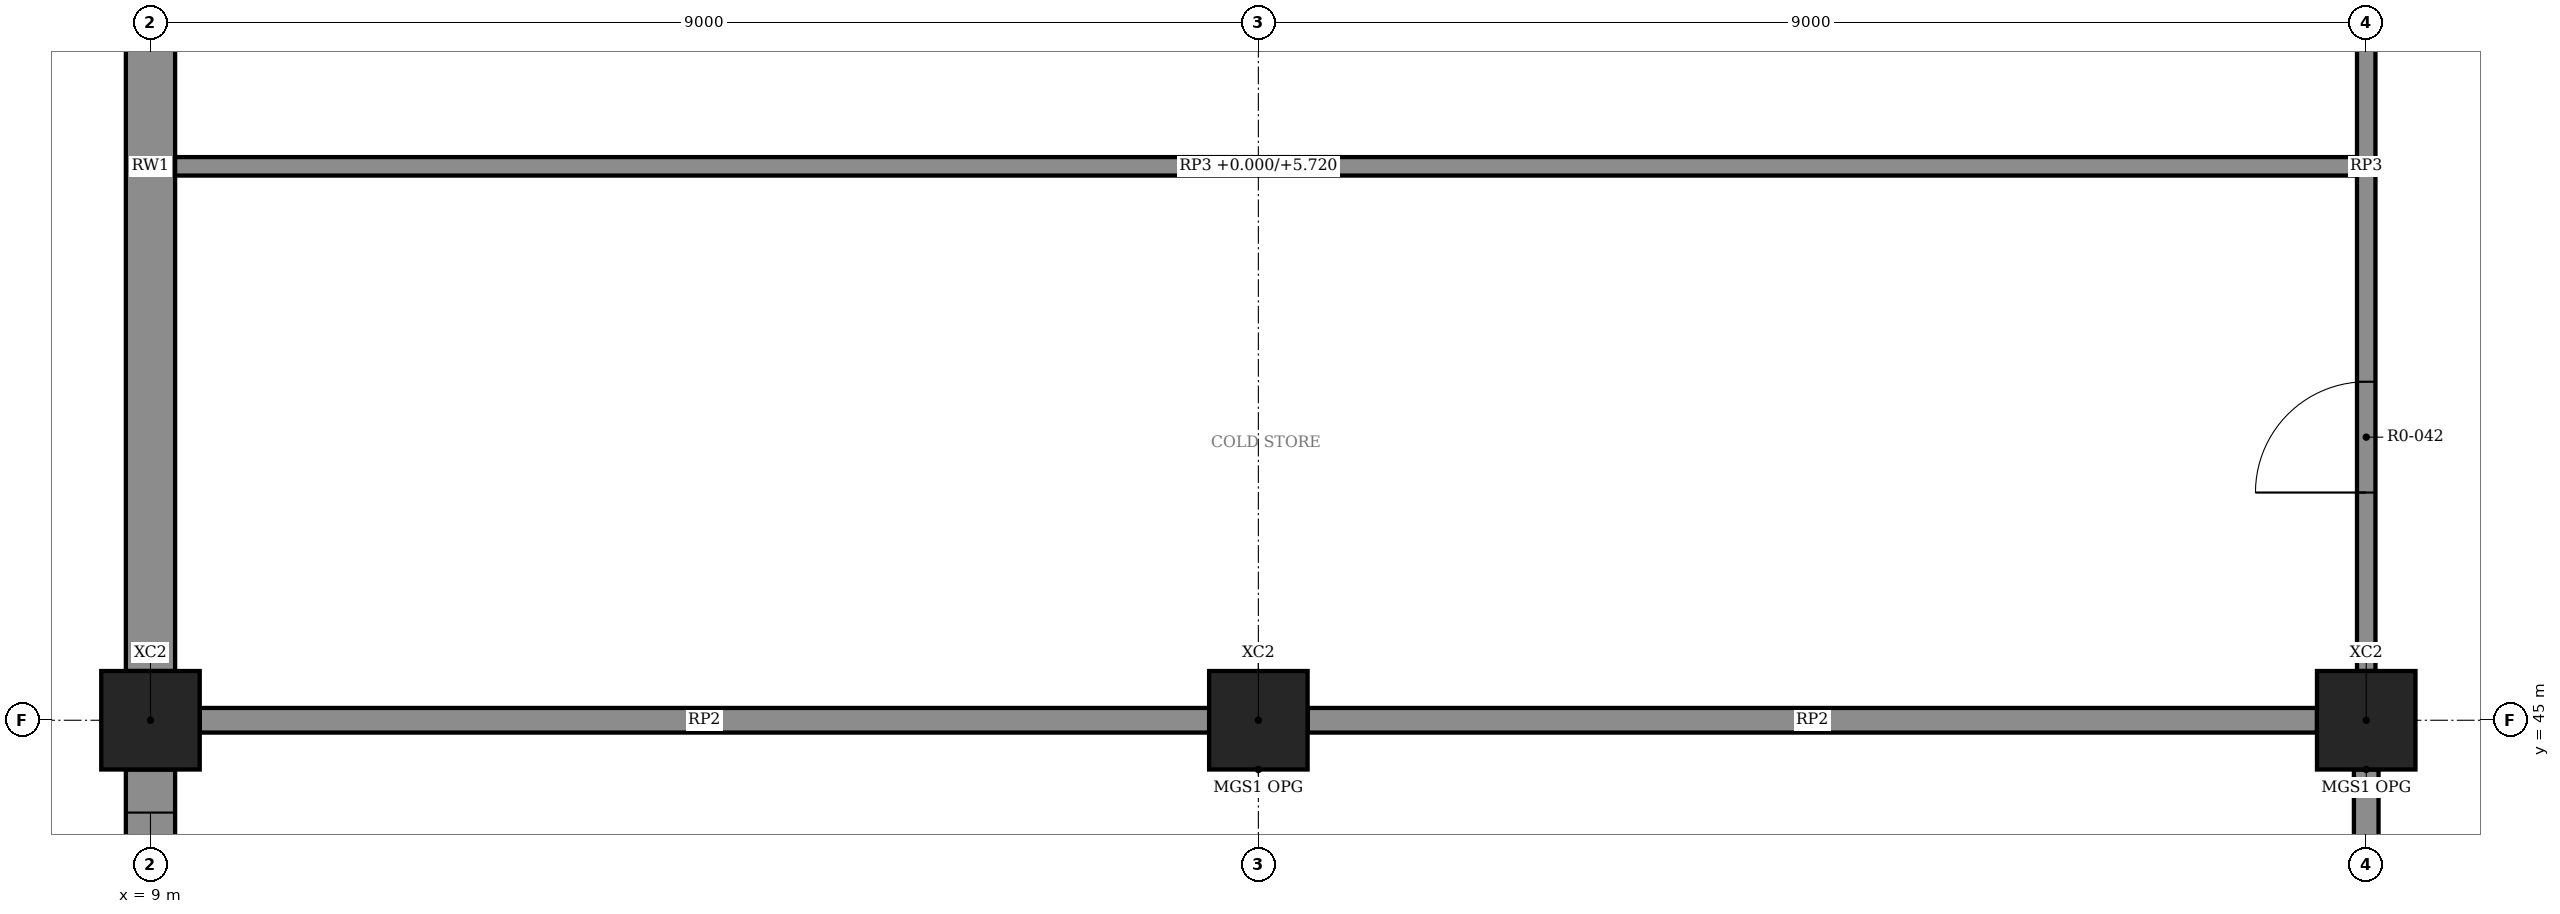
"""IFC4 building model, lengths in metres.
Left out: names, types, materials, properties, quantities, classifications, styles, units other than length and angle.
Written with IfcOpenShell. Run it as: python <this file> out.ifc"""

import sys

from ifc_helpers import new_model, si_unit, direction, frame, frame_2d, origin, origin_2d, place, context, subcontext, project, spatial, rectangle, extrude, element, fill, save


model = new_model("IFC4")
c1 = context("Model", 3, precision=1e-05, world=origin(), true_north=direction((0.0, 1.0)))
c2 = subcontext(c1, "Body", "Model", "MODEL_VIEW")
j1 = project(units=[si_unit("LENGTHUNIT", "METRE"), si_unit("PLANEANGLEUNIT", "RADIAN")], contexts=[c1])
p1 = place(None, origin())
s1 = spatial("IfcSite", under=j1, at=p1, CompositionType="ELEMENT")
p2 = place(p1, origin())
s2 = spatial("IfcBuilding", under=s1, at=p2, CompositionType="ELEMENT")
p3 = place(p2, origin())
s3 = spatial("IfcBuildingStorey", under=s2, at=p3, CompositionType="ELEMENT", Elevation=0.0)
for number, where, z_axis, x_axis in (
    (1, (9.0, 45.0, -0.3), (0.0, 0.0, 1.0), (1.0, 0.0, 0.0)),
    (2, (18.0, 45.0, -0.3), (0.0, 0.0, 1.0), (1.0, 0.0, 0.0)),
    (3, (27.0, 45.0, -0.3), (0.0, 0.0, 1.0), (1.0, 0.0, 0.0)),
):
    element("IfcColumn", number, at=place(p3, frame(where, z_axis=z_axis, x_axis=x_axis)), inside=s3, PredefinedType="COLUMN", context=c2, shape_type="SweptSolid", body=[
        extrude(rectangle(XDim=0.8, YDim=0.8, at=origin_2d()), origin(), (0.0, 0.0, 1.0), 6.3),
    ])
p4 = place(p3, frame((9.0, 36.4, 0.0), z_axis=(0.0, 0.0, 1.0), x_axis=(0.0, 1.0, 0.0)))
e4 = element("IfcWall", 4, at=p4, inside=s3, PredefinedType="SOLIDWALL", context=c2, shape_type="SweptSolid", body=[
    extrude(rectangle(XDim=8.2, YDim=0.4, at=frame_2d((4.1, 0.0))), origin(), (0.0, 0.0, 1.0), 4.82),
])
p5 = place(p4, frame((0.35, 0.0, 0.6)))
e5 = element("IfcOpeningElement", 5, at=p5, cuts=e4, PredefinedType="OPENING", context=c2, shape_type="SweptSolid", body=[
    extrude(rectangle(XDim=1.5, YDim=2.7, at=frame_2d((0.75, 1.35))), frame((0.0, 0.21, 0.0), z_axis=(0.0, -1.0, 0.0), x_axis=(1.0, 0.0, 0.0)), (0.0, 0.0, 1.0), 0.42),
])
p6 = place(p4, frame((6.35, 0.0, 0.6)))
e6 = element("IfcOpeningElement", 6, at=p6, cuts=e4, PredefinedType="OPENING", context=c2, shape_type="SweptSolid", body=[
    extrude(rectangle(XDim=1.5, YDim=2.7, at=frame_2d((0.75, 1.35))), frame((0.0, 0.21, 0.0), z_axis=(0.0, -1.0, 0.0), x_axis=(1.0, 0.0, 0.0)), (0.0, 0.0, 1.0), 0.42),
])
p7 = place(p4, frame((2.75, 0.0, 0.0)))
e7 = element("IfcOpeningElement", 7, at=p7, cuts=e4, PredefinedType="OPENING", context=c2, shape_type="SweptSolid", body=[
    extrude(rectangle(XDim=2.7, YDim=2.4, at=frame_2d((1.35, 1.2))), frame((0.0, 0.21, 0.0), z_axis=(0.0, -1.0, 0.0), x_axis=(1.0, 0.0, 0.0)), (0.0, 0.0, 1.0), 0.42),
])
p8 = place(p3, frame((9.0, 45.4, 0.0), z_axis=(0.0, 0.0, 1.0), x_axis=(0.0, 1.0, 0.0)))
e8 = element("IfcWall", 8, at=p8, inside=s3, PredefinedType="SOLIDWALL", context=c2, shape_type="SweptSolid", body=[
    extrude(rectangle(XDim=8.2, YDim=0.4, at=frame_2d((4.1, 0.0))), origin(), (0.0, 0.0, 1.0), 4.82),
])
for number, where, z_axis, x_axis in (
    (9, (9.4, 45.0, 0.0), (0.0, 0.0, 1.0), (1.0, 0.0, 0.0)),
    (10, (18.4, 45.0, 0.0), (0.0, 0.0, 1.0), (1.0, 0.0, 0.0)),
):
    element("IfcWall", number, at=place(p3, frame(where, z_axis=z_axis, x_axis=x_axis)), inside=s3, PredefinedType="PARTITIONING", context=c2, shape_type="SweptSolid", body=[
        extrude(rectangle(XDim=8.2, YDim=0.2, at=frame_2d((4.1, 0.0))), origin(), (0.0, 0.0, 1.0), 4.82),
    ])
p9 = place(p3, frame((9.0, 49.5, 0.0), z_axis=(0.0, 0.0, 1.0), x_axis=(1.0, 0.0, 0.0)))
e11 = element("IfcWall", 11, at=p9, inside=s3, PredefinedType="PARTITIONING", context=c2, shape_type="SweptSolid", body=[
    extrude(rectangle(XDim=18.0, YDim=0.15, at=frame_2d((9.0, 0.0))), origin(), (0.0, 0.0, 1.0), 5.72),
])
p10 = place(p3, frame((27.0, 36.4, 0.0), z_axis=(0.0, 0.0, 1.0), x_axis=(0.0, 1.0, 0.0)))
e12 = element("IfcWall", 12, at=p10, inside=s3, PredefinedType="PARTITIONING", context=c2, shape_type="SweptSolid", body=[
    extrude(rectangle(XDim=8.2, YDim=0.2, at=frame_2d((4.1, 0.0))), origin(), (0.0, 0.0, 1.0), 4.82),
])
p11 = place(p3, frame((27.0, 45.4, 0.0), z_axis=(0.0, 0.0, 1.0), x_axis=(0.0, 1.0, 0.0)))
e13 = element("IfcWall", 13, at=p11, inside=s3, PredefinedType="PARTITIONING", context=c2, shape_type="SweptSolid", body=[
    extrude(rectangle(XDim=8.2, YDim=0.15, at=frame_2d((4.1, 0.0))), origin(), (0.0, 0.0, 1.0), 4.82),
])
p12 = place(p11, frame((1.45, 0.0, 0.0)))
e14 = element("IfcOpeningElement", 14, at=p12, cuts=e13, PredefinedType="OPENING", context=c2, shape_type="SweptSolid", body=[
    extrude(rectangle(XDim=0.9, YDim=2.1, at=frame_2d((0.45, 1.05))), frame((0.0, 0.085, 0.0), z_axis=(0.0, -1.0, 0.0), x_axis=(1.0, 0.0, 0.0)), (0.0, 0.0, 1.0), 0.17),
])
p13 = place(p11, frame((5.95, 0.0, 0.0)))
e15 = element("IfcOpeningElement", 15, at=p13, cuts=e13, PredefinedType="OPENING", context=c2, shape_type="SweptSolid", body=[
    extrude(rectangle(XDim=0.9, YDim=2.1, at=frame_2d((0.45, 1.05))), frame((0.0, 0.085, 0.0), z_axis=(0.0, -1.0, 0.0), x_axis=(1.0, 0.0, 0.0)), (0.0, 0.0, 1.0), 0.17),
])
p14 = place(p6, origin())
e16 = element("IfcWindow", 16, at=p14, inside=s3, PartitioningType="SINGLE_PANEL", PredefinedType="WINDOW", context=c2, shape_type="SweptSolid", body=[
    extrude(rectangle(XDim=1.5, YDim=2.7, at=frame_2d((0.75, 1.35))), frame((0.0, 0.03, 0.0), z_axis=(0.0, -1.0, 0.0), x_axis=(1.0, 0.0, 0.0)), (0.0, 0.0, 1.0), 0.06),
])
fill(e6, e16)
p15 = place(p12, origin())
e17 = element("IfcDoor", 17, at=p15, inside=s3, OperationType="SINGLE_SWING_LEFT", PredefinedType="DOOR", context=c2, shape_type="SweptSolid", body=[
    extrude(rectangle(XDim=0.9, YDim=2.1, at=frame_2d((0.45, 1.05))), frame((0.0, 0.025, 0.0), z_axis=(0.0, -1.0, 0.0), x_axis=(1.0, 0.0, 0.0)), (0.0, 0.0, 1.0), 0.05),
])
fill(e14, e17)
save(model, sys.argv[1])
